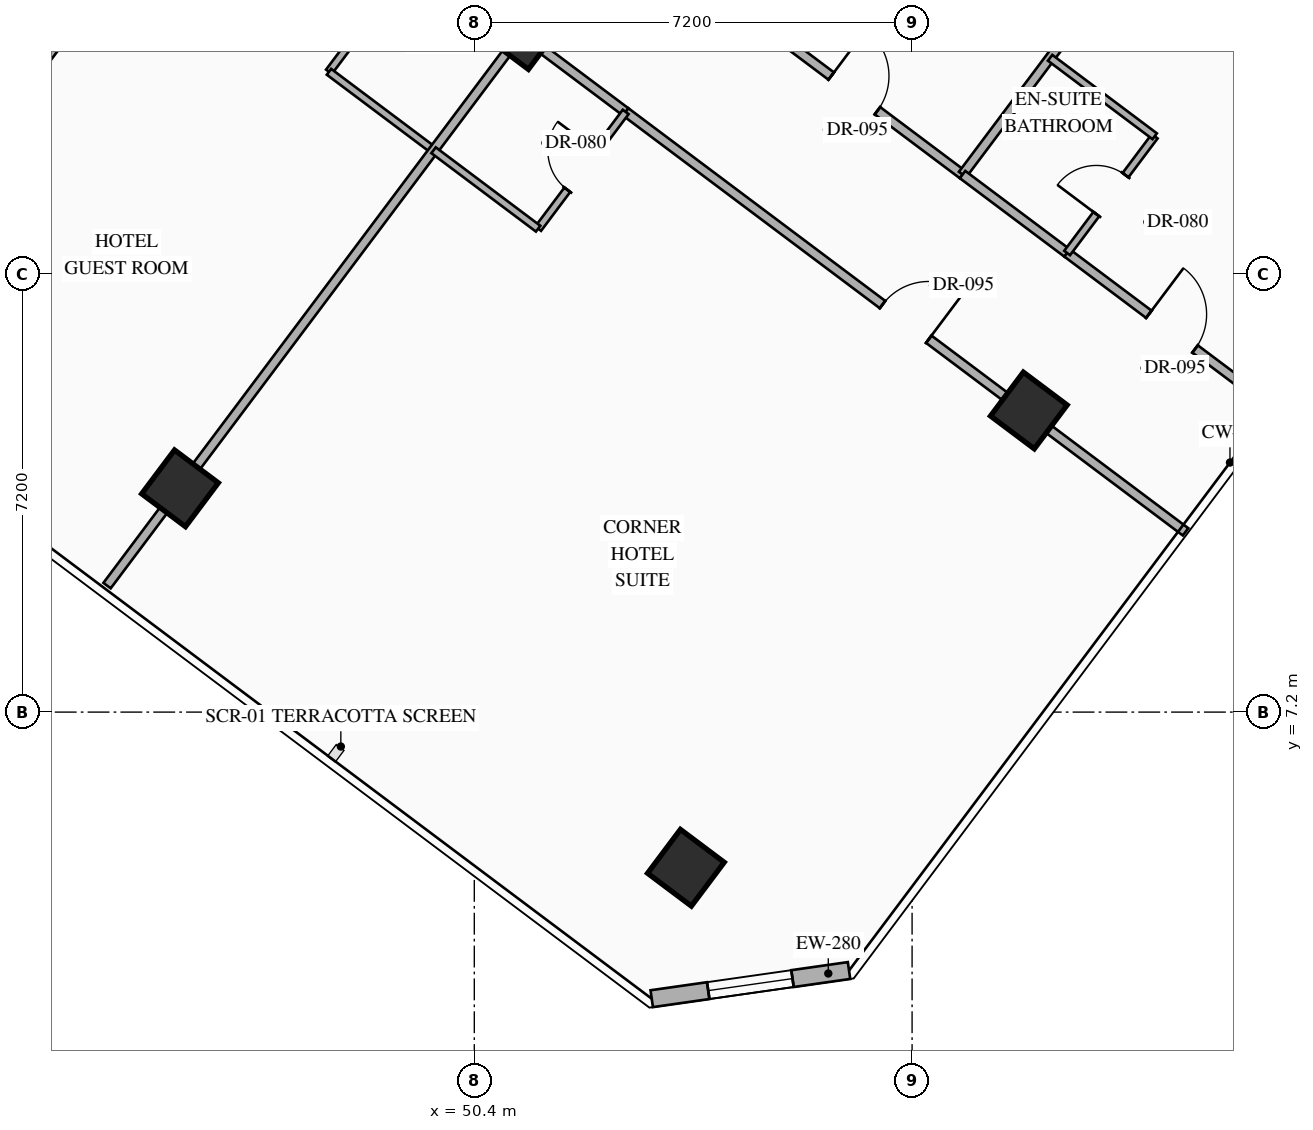
"""IFC4 building model, lengths in metres.
Left out: names, types, materials, properties, quantities, classifications, styles, units other than length and angle.
Written with IfcOpenShell. Run it as: python <this file> out.ifc"""

import sys

from ifc_helpers import new_model, si_unit, direction, frame, frame_2d, origin, origin_2d, place, context, subcontext, project, spatial, rectangle, hollow_rectangle, extrude, element, fill, save


model = new_model("IFC4")
c1 = context("Model", 3, precision=1e-05, world=origin(), true_north=direction((0.0, 1.0)))
c2 = subcontext(c1, "Body", "Model", "MODEL_VIEW")
j1 = project(units=[si_unit("LENGTHUNIT", "METRE"), si_unit("PLANEANGLEUNIT", "RADIAN")], contexts=[c1])
p1 = place(None, origin())
s1 = spatial("IfcSite", under=j1, at=p1, CompositionType="ELEMENT")
p2 = place(p1, origin())
s2 = spatial("IfcBuilding", under=s1, at=p2, CompositionType="ELEMENT")
p3 = place(p2, frame((0.0, 0.0, 84.65)))
s3 = spatial("IfcBuildingStorey", under=s2, at=p3, CompositionType="ELEMENT", Elevation=84.65)
for number, where, z_axis, x_axis in (
    (1, (45.56, 10.88, 0.0), (0.0, 0.0, 1.0), (0.8, -0.6, 0.0)),
    (2, (51.2, 18.4, 0.0), (0.0, 0.0, 1.0), (0.8, -0.6, 0.0)),
    (3, (53.88, 4.64, 0.0), (0.0, 0.0, 1.0), (0.8, -0.6, 0.0)),
    (4, (59.52, 12.16, 0.0), (0.0, 0.0, 1.0), (0.8, -0.6, 0.0)),
):
    element("IfcColumn", number, at=place(p3, frame(where, z_axis=z_axis, x_axis=x_axis)), inside=s3, PredefinedType="COLUMN", context=c2, shape_type="SweptSolid", body=[
        extrude(hollow_rectangle(XDim=0.9, YDim=0.9, WallThickness=0.036, at=origin_2d()), origin(), (0.0, 0.0, 1.0), 3.35),
    ])
p4 = place(p3, frame((56.563, 2.95, 0.0), z_axis=(0.0, 0.0, 1.0), x_axis=(-0.989977778067, -0.141223223777, 0.0)))
e5 = element("IfcWall", 5, at=p4, inside=s3, PredefinedType="STANDARD", context=c2, shape_type="SweptSolid", body=[
    extrude(rectangle(XDim=3.278, YDim=0.28, at=frame_2d((1.639, 0.0))), origin(), (0.0, 0.0, 1.0), 3.13),
])
p5 = place(p4, frame((0.939, 0.0, 0.85)))
e6 = element("IfcOpeningElement", 6, at=p5, cuts=e5, PredefinedType="OPENING", context=c2, shape_type="SweptSolid", body=[
    extrude(rectangle(XDim=1.4, YDim=1.8, at=frame_2d((0.7, 0.9))), frame((0.0, 0.15, 0.0), z_axis=(0.0, -1.0, 0.0), x_axis=(1.0, 0.0, 0.0)), (0.0, 0.0, 1.0), 0.3),
])
p6 = place(p3, frame((39.464, 12.752, 0.0), z_axis=(0.0, 0.0, 1.0), x_axis=(0.6, 0.8, 0.0)))
e7 = element("IfcWall", 7, at=p6, inside=s3, PredefinedType="PARTITIONING", context=c2, shape_type="SweptSolid", body=[
    extrude(rectangle(XDim=11.51, YDim=0.15, at=frame_2d((5.755, 0.0))), origin(), (0.0, 0.0, 1.0), 3.13),
])
p7 = place(p3, frame((54.87, 18.71, 0.0), z_axis=(0.0, 0.0, 1.0), x_axis=(0.799993416095, -0.600008778439, 0.0)))
e8 = element("IfcWall", 8, at=p7, inside=s3, PredefinedType="PARTITIONING", context=c2, shape_type="SweptSolid", body=[
    extrude(rectangle(XDim=4.45, YDim=0.15, at=frame_2d((2.225, 0.0))), origin(), (0.0, 0.0, 1.0), 2.775),
])
p8 = place(p7, frame((1.75, 0.0, 0.0)))
e9 = element("IfcOpeningElement", 9, at=p8, cuts=e8, PredefinedType="OPENING", context=c2, shape_type="SweptSolid", body=[
    extrude(rectangle(XDim=0.95, YDim=2.15, at=frame_2d((0.475, 1.075))), frame((0.0, 0.085, 0.0), z_axis=(0.0, -1.0, 0.0), x_axis=(1.0, 0.0, 0.0)), (0.0, 0.0, 1.0), 0.17),
])
p9 = place(p3, frame((58.43, 16.04, 0.0), z_axis=(0.0, 0.0, 1.0), x_axis=(0.60001014597, 0.799992390422, 0.0)))
e10 = element("IfcWall", 10, at=p9, inside=s3, PredefinedType="PARTITIONING", context=c2, shape_type="SweptSolid", body=[
    extrude(rectangle(XDim=11.55, YDim=0.15, at=frame_2d((5.775, 0.0))), origin(), (0.0, 0.0, 1.0), 3.13),
])
p10 = place(p3, frame((58.43, 16.04, 0.0), z_axis=(0.0, 0.0, 1.0), x_axis=(0.79998637334, -0.60001816845, 0.0)))
e11 = element("IfcWall", 11, at=p10, inside=s3, PredefinedType="PARTITIONING", context=c2, shape_type="SweptSolid", body=[
    extrude(rectangle(XDim=2.15, YDim=0.15, at=frame_2d((1.075, 0.0))), origin(), (0.0, 0.0, 1.0), 2.775),
])
p11 = place(p3, frame((60.15, 14.75, 0.0), z_axis=(0.0, 0.0, 1.0), x_axis=(0.800006797429, -0.599990936654, 0.0)))
e12 = element("IfcWall", 12, at=p11, inside=s3, PredefinedType="PARTITIONING", context=c2, shape_type="SweptSolid", body=[
    extrude(rectangle(XDim=4.31, YDim=0.15, at=frame_2d((2.155, 0.0))), origin(), (0.0, 0.0, 1.0), 2.775),
])
p12 = place(p11, frame((1.68, 0.0, 0.0)))
e13 = element("IfcOpeningElement", 13, at=p12, cuts=e12, PredefinedType="OPENING", context=c2, shape_type="SweptSolid", body=[
    extrude(rectangle(XDim=0.95, YDim=2.15, at=frame_2d((0.475, 1.075))), frame((0.0, 0.085, 0.0), z_axis=(0.0, -1.0, 0.0), x_axis=(1.0, 0.0, 0.0)), (0.0, 0.0, 1.0), 0.17),
])
p13 = place(p3, frame((60.15, 14.75, 0.0), z_axis=(0.0, 0.0, 1.0), x_axis=(0.600065100855, 0.79995117022, 0.0)))
e14 = element("IfcWall", 14, at=p13, inside=s3, PredefinedType="PARTITIONING", context=c2, shape_type="SweptSolid", body=[
    extrude(rectangle(XDim=2.4, YDim=0.12, at=frame_2d((1.2, 0.0))), origin(), (0.0, 0.0, 1.0), 3.13),
])
p14 = place(p13, frame((0.8, 0.0, 0.0)))
e15 = element("IfcOpeningElement", 15, at=p14, cuts=e14, PredefinedType="OPENING", context=c2, shape_type="SweptSolid", body=[
    extrude(rectangle(XDim=0.8, YDim=2.06, at=frame_2d((0.4, 1.03))), frame((0.0, 0.07, 0.0), z_axis=(0.0, -1.0, 0.0), x_axis=(1.0, 0.0, 0.0)), (0.0, 0.0, 1.0), 0.14),
])
p15 = place(p3, frame((59.87, 17.96, 0.0), z_axis=(0.0, 0.0, 1.0), x_axis=(0.79998637334, -0.60001816845, 0.0)))
e16 = element("IfcWall", 16, at=p15, inside=s3, PredefinedType="PARTITIONING", context=c2, shape_type="SweptSolid", body=[
    extrude(rectangle(XDim=2.15, YDim=0.12, at=frame_2d((1.075, 0.0))), origin(), (0.0, 0.0, 1.0), 3.13),
])
p16 = place(p3, frame((48.01, 17.73, 0.0), z_axis=(0.0, 0.0, 1.0), x_axis=(0.6, 0.8, 0.0)))
e17 = element("IfcWall", 17, at=p16, inside=s3, PredefinedType="PARTITIONING", context=c2, shape_type="SweptSolid", body=[
    extrude(rectangle(XDim=2.4, YDim=0.12, at=frame_2d((1.2, 0.0))), origin(), (0.0, 0.0, 1.0), 3.13),
])
p17 = place(p16, frame((0.8, 0.0, 0.0)))
e18 = element("IfcOpeningElement", 18, at=p17, cuts=e17, PredefinedType="OPENING", context=c2, shape_type="SweptSolid", body=[
    extrude(rectangle(XDim=0.8, YDim=2.06, at=frame_2d((0.4, 1.03))), frame((0.0, 0.07, 0.0), z_axis=(0.0, -1.0, 0.0), x_axis=(1.0, 0.0, 0.0)), (0.0, 0.0, 1.0), 0.14),
])
p18 = place(p3, frame((48.01, 17.73, 0.0), z_axis=(0.0, 0.0, 1.0), x_axis=(0.79998637334, -0.60001816845, 0.0)))
e19 = element("IfcWall", 19, at=p18, inside=s3, PredefinedType="PARTITIONING", context=c2, shape_type="SweptSolid", body=[
    extrude(rectangle(XDim=2.15, YDim=0.12, at=frame_2d((1.075, 0.0))), origin(), (0.0, 0.0, 1.0), 3.13),
])
p19 = place(p3, frame((44.36, 9.28, 0.0), z_axis=(0.0, 0.0, 1.0), x_axis=(0.599986233332, 0.800010324816, 0.0)))
e20 = element("IfcWall", 20, at=p19, inside=s3, PredefinedType="PARTITIONING", context=c2, shape_type="SweptSolid", body=[
    extrude(rectangle(XDim=11.35, YDim=0.15, at=frame_2d((5.675, 0.0))), origin(), (0.0, 0.0, 1.0), 2.425),
])
p20 = place(p3, frame((51.17, 18.36, 0.0), z_axis=(0.0, 0.0, 1.0), x_axis=(0.79998637334, -0.60001816845, 0.0)))
e21 = element("IfcWall", 21, at=p20, inside=s3, PredefinedType="PARTITIONING", context=c2, shape_type="SweptSolid", body=[
    extrude(rectangle(XDim=2.15, YDim=0.15, at=frame_2d((1.075, 0.0))), origin(), (0.0, 0.0, 1.0), 2.425),
])
p21 = place(p3, frame((52.89, 17.07, 0.0), z_axis=(0.0, 0.0, 1.0), x_axis=(0.8, -0.6, 0.0)))
e22 = element("IfcWall", 22, at=p21, inside=s3, PredefinedType="PARTITIONING", context=c2, shape_type="SweptSolid", body=[
    extrude(rectangle(XDim=11.51, YDim=0.15, at=frame_2d((5.755, 0.0))), origin(), (0.0, 0.0, 1.0), 2.425),
])
p22 = place(p21, frame((5.28, 0.0, 0.0)))
e23 = element("IfcOpeningElement", 23, at=p22, cuts=e22, PredefinedType="OPENING", context=c2, shape_type="SweptSolid", body=[
    extrude(rectangle(XDim=0.95, YDim=2.15, at=frame_2d((0.475, 1.075))), frame((0.0, 0.085, 0.0), z_axis=(0.0, -1.0, 0.0), x_axis=(1.0, 0.0, 0.0)), (0.0, 0.0, 1.0), 0.17),
])
p23 = place(p3, frame((51.45, 15.15, 0.0), z_axis=(0.0, 0.0, 1.0), x_axis=(0.599951172744, 0.800036618114, 0.0)))
e24 = element("IfcWall", 24, at=p23, inside=s3, PredefinedType="PARTITIONING", context=c2, shape_type="SweptSolid", body=[
    extrude(rectangle(XDim=2.4, YDim=0.12, at=frame_2d((1.2, 0.0))), origin(), (0.0, 0.0, 1.0), 3.13),
])
p24 = place(p23, frame((0.8, 0.0, 0.0)))
e25 = element("IfcOpeningElement", 25, at=p24, cuts=e24, PredefinedType="OPENING", context=c2, shape_type="SweptSolid", body=[
    extrude(rectangle(XDim=0.8, YDim=2.06, at=frame_2d((0.4, 1.03))), frame((0.0, 0.07, 0.0), z_axis=(0.0, -1.0, 0.0), x_axis=(1.0, 0.0, 0.0)), (0.0, 0.0, 1.0), 0.14),
])
p25 = place(p3, frame((49.73, 16.44, 0.0), z_axis=(0.0, 0.0, 1.0), x_axis=(0.79998637334, -0.60001816845, 0.0)))
e26 = element("IfcWall", 26, at=p25, inside=s3, PredefinedType="PARTITIONING", context=c2, shape_type="SweptSolid", body=[
    extrude(rectangle(XDim=2.15, YDim=0.12, at=frame_2d((1.075, 0.0))), origin(), (0.0, 0.0, 1.0), 3.13),
])
p26 = place(p5, origin())
e27 = element("IfcWindow", 27, at=p26, inside=s3, PartitioningType="SINGLE_PANEL", PredefinedType="WINDOW", context=c2, shape_type="SweptSolid", body=[
    extrude(rectangle(XDim=1.4, YDim=1.8, at=frame_2d((0.7, 0.9))), frame((0.0, 0.03, 0.0), z_axis=(0.0, -1.0, 0.0), x_axis=(1.0, 0.0, 0.0)), (0.0, 0.0, 1.0), 0.06),
])
fill(e6, e27)
p27 = place(p8, origin())
e28 = element("IfcDoor", 28, at=p27, inside=s3, OperationType="SINGLE_SWING_LEFT", PredefinedType="DOOR", context=c2, shape_type="SweptSolid", body=[
    extrude(rectangle(XDim=0.95, YDim=2.15, at=frame_2d((0.475, 1.075))), frame((0.0, 0.025, 0.0), z_axis=(0.0, -1.0, 0.0), x_axis=(1.0, 0.0, 0.0)), (0.0, 0.0, 1.0), 0.05),
])
fill(e9, e28)
p28 = place(p12, origin())
e29 = element("IfcDoor", 29, at=p28, inside=s3, OperationType="SINGLE_SWING_LEFT", PredefinedType="DOOR", context=c2, shape_type="SweptSolid", body=[
    extrude(rectangle(XDim=0.95, YDim=2.15, at=frame_2d((0.475, 1.075))), frame((0.0, 0.025, 0.0), z_axis=(0.0, -1.0, 0.0), x_axis=(1.0, 0.0, 0.0)), (0.0, 0.0, 1.0), 0.05),
])
fill(e13, e29)
p29 = place(p14, origin())
e30 = element("IfcDoor", 30, at=p29, inside=s3, OperationType="SINGLE_SWING_LEFT", PredefinedType="DOOR", context=c2, shape_type="SweptSolid", body=[
    extrude(rectangle(XDim=0.8, YDim=2.06, at=frame_2d((0.4, 1.03))), frame((0.0, 0.025, 0.0), z_axis=(0.0, -1.0, 0.0), x_axis=(1.0, 0.0, 0.0)), (0.0, 0.0, 1.0), 0.05),
])
fill(e15, e30)
p30 = place(p22, origin())
e31 = element("IfcDoor", 31, at=p30, inside=s3, OperationType="SINGLE_SWING_RIGHT", PredefinedType="DOOR", context=c2, shape_type="SweptSolid", body=[
    extrude(rectangle(XDim=0.95, YDim=2.15, at=frame_2d((0.475, 1.075))), frame((0.0, 0.025, 0.0), z_axis=(0.0, -1.0, 0.0), x_axis=(1.0, 0.0, 0.0)), (0.0, 0.0, 1.0), 0.05),
])
fill(e23, e31)
p31 = place(p24, origin())
e32 = element("IfcDoor", 32, at=p31, inside=s3, OperationType="SINGLE_SWING_RIGHT", PredefinedType="DOOR", context=c2, shape_type="SweptSolid", body=[
    extrude(rectangle(XDim=0.8, YDim=2.06, at=frame_2d((0.4, 1.03))), frame((0.0, 0.025, 0.0), z_axis=(0.0, -1.0, 0.0), x_axis=(1.0, 0.0, 0.0)), (0.0, 0.0, 1.0), 0.05),
])
fill(e25, e32)
save(model, sys.argv[1])
